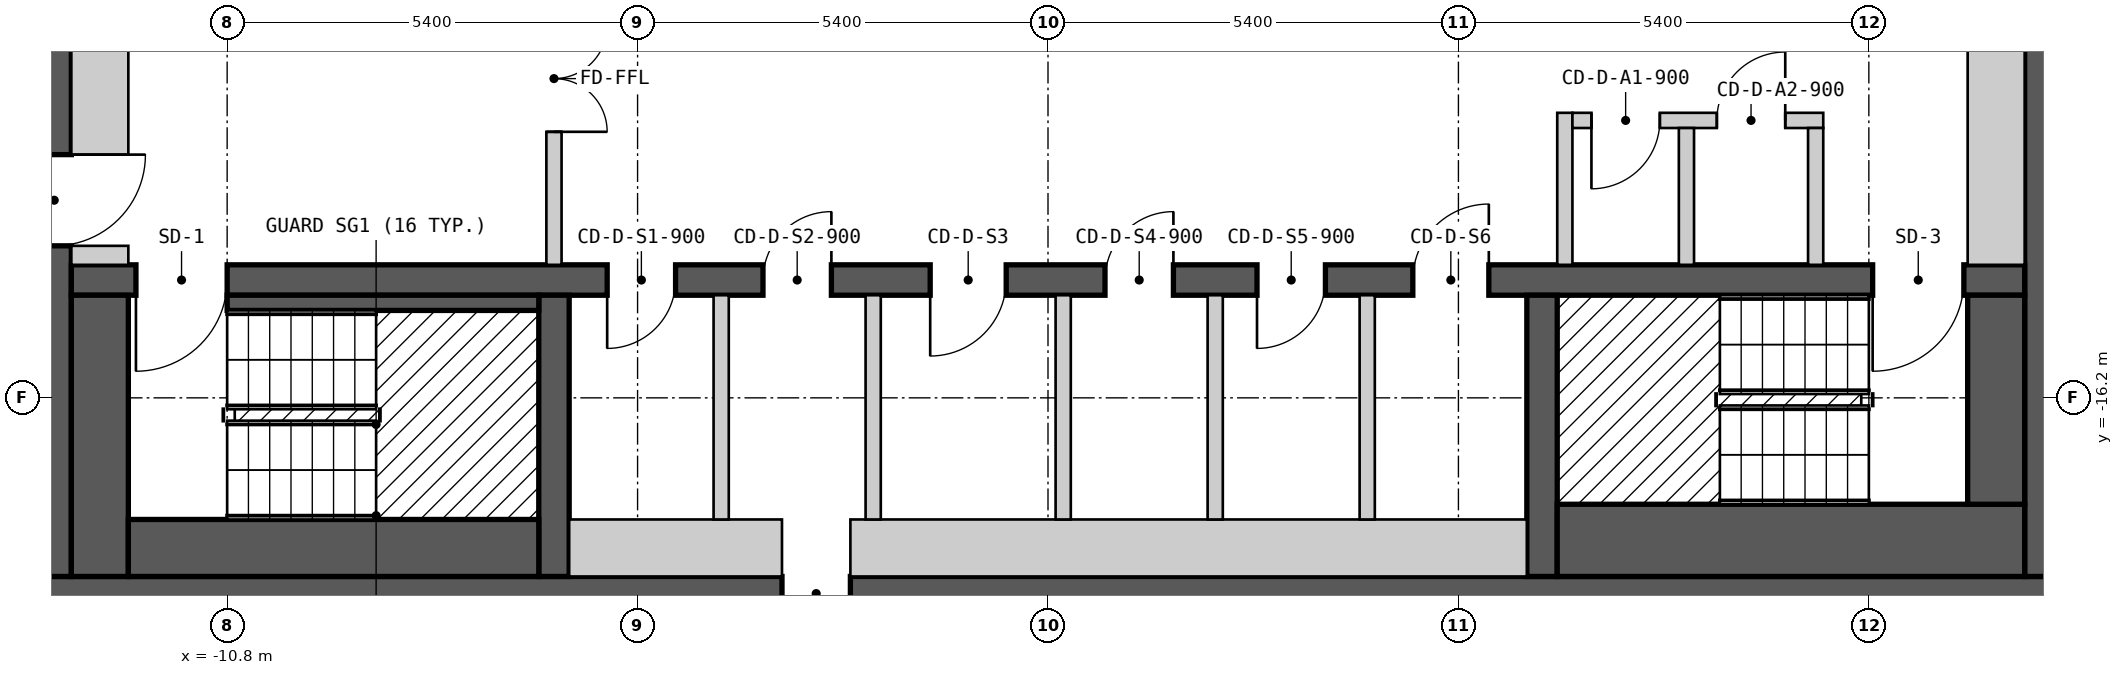
"""IFC4 building model, lengths in metres.
Left out: names, types, materials, properties, quantities, classifications, styles, units other than length and angle.
Written with IfcOpenShell. Run it as: python <this file> out.ifc"""

import sys

from ifc_helpers import new_model, si_unit, direction, frame, frame_2d, origin, place, context, subcontext, project, spatial, polyline, rectangle, outline, extrude, element, fill, save


model = new_model("IFC4")
c1 = context("Model", 3, precision=1e-05, world=origin(), true_north=direction((0.0, 1.0)))
c2 = subcontext(c1, "Body", "Model", "MODEL_VIEW")
j1 = project(units=[si_unit("LENGTHUNIT", "METRE"), si_unit("PLANEANGLEUNIT", "RADIAN")], contexts=[c1])
p1 = place(None, origin())
s1 = spatial("IfcSite", under=j1, at=p1, CompositionType="ELEMENT")
p2 = place(p1, origin())
s2 = spatial("IfcBuilding", under=s1, at=p2, CompositionType="ELEMENT")
p3 = place(p2, frame((0.0, 0.0, 226.8)))
s3 = spatial("IfcBuildingStorey", under=s2, at=p3, CompositionType="ELEMENT", Elevation=226.8)
p4 = place(p3, frame((-13.3, -18.775, 0.0), z_axis=(0.0, 0.0, 1.0), x_axis=(1.0, 0.0, 0.0)))
e1 = element("IfcWall", 1, at=p4, inside=s3, PredefinedType="SHEAR", context=c2, shape_type="SweptSolid", body=[
    extrude(rectangle(XDim=26.6, YDim=0.45, at=frame_2d((13.3, 0.0))), origin(), (0.0, 0.0, 1.0), 2.7),
])
p5 = place(p4, frame((9.8, 0.0, 0.0)))
e2 = element("IfcOpeningElement", 2, at=p5, cuts=e1, PredefinedType="OPENING", context=c2, shape_type="SweptSolid", body=[
    extrude(rectangle(XDim=0.9, YDim=2.1, at=frame_2d((0.45, 1.05))), frame((0.0, 0.235, 0.0), z_axis=(0.0, -1.0, 0.0), x_axis=(1.0, 0.0, 0.0)), (0.0, 0.0, 1.0), 0.47),
])
p6 = place(p3, frame((-13.075, -18.55, 0.0), z_axis=(0.0, 0.0, 1.0), x_axis=(0.0, 1.0, 0.0)))
e3 = element("IfcWall", 3, at=p6, inside=s3, PredefinedType="SHEAR", context=c2, shape_type="SweptSolid", body=[
    extrude(rectangle(XDim=13.1, YDim=0.45, at=frame_2d((6.55, 0.0))), origin(), (0.0, 0.0, 1.0), 2.7),
])
p7 = place(p6, frame((4.35, 0.0, 0.0)))
e4 = element("IfcOpeningElement", 4, at=p7, cuts=e3, PredefinedType="OPENING", context=c2, shape_type="SweptSolid", body=[
    extrude(rectangle(XDim=1.2, YDim=2.1, at=frame_2d((0.6, 1.05))), frame((0.0, 0.235, 0.0), z_axis=(0.0, -1.0, 0.0), x_axis=(1.0, 0.0, 0.0)), (0.0, 0.0, 1.0), 0.47),
])
p8 = place(p3, frame((13.075, -18.55, 0.0), z_axis=(0.0, 0.0, 1.0), x_axis=(0.0, 1.0, 0.0)))
e5 = element("IfcWall", 5, at=p8, inside=s3, PredefinedType="SHEAR", context=c2, shape_type="SweptSolid", body=[
    extrude(rectangle(XDim=13.1, YDim=0.45, at=frame_2d((6.55, 0.0))), origin(), (0.0, 0.0, 1.0), 2.7),
])
p9 = place(p3, frame((-12.85, -14.65, 0.0), z_axis=(0.0, 0.0, 1.0), x_axis=(1.0, 0.0, 0.0)))
e6 = element("IfcWall", 6, at=p9, inside=s3, PredefinedType="SHEAR", context=c2, shape_type="SweptSolid", body=[
    extrude(rectangle(XDim=25.7, YDim=0.4, at=frame_2d((12.85, 0.0))), origin(), (0.0, 0.0, 1.0), 2.7),
])
p10 = place(p9, frame((2.05, 0.0, 0.0), z_axis=(0.0, 0.0, 1.0), x_axis=(-1.0, 0.0, 0.0)))
e7 = element("IfcOpeningElement", 7, at=p10, cuts=e6, PredefinedType="OPENING", context=c2, shape_type="SweptSolid", body=[
    extrude(rectangle(XDim=1.2, YDim=2.1, at=frame_2d((0.6, 1.05))), frame((0.0, 0.21, 0.0), z_axis=(0.0, -1.0, 0.0), x_axis=(1.0, 0.0, 0.0)), (0.0, 0.0, 1.0), 0.42),
])
p11 = place(p9, frame((24.9, 0.0, 0.0), z_axis=(0.0, 0.0, 1.0), x_axis=(-1.0, 0.0, 0.0)))
e8 = element("IfcOpeningElement", 8, at=p11, cuts=e6, PredefinedType="OPENING", context=c2, shape_type="SweptSolid", body=[
    extrude(rectangle(XDim=1.2, YDim=2.1, at=frame_2d((0.6, 1.05))), frame((0.0, 0.21, 0.0), z_axis=(0.0, -1.0, 0.0), x_axis=(1.0, 0.0, 0.0)), (0.0, 0.0, 1.0), 0.42),
])
p12 = place(p9, frame((7.95, 0.0, 0.0), z_axis=(0.0, 0.0, 1.0), x_axis=(-1.0, 0.0, 0.0)))
e9 = element("IfcOpeningElement", 9, at=p12, cuts=e6, PredefinedType="OPENING", context=c2, shape_type="SweptSolid", body=[
    extrude(rectangle(XDim=0.9, YDim=2.1, at=frame_2d((0.45, 1.05))), frame((0.0, 0.21, 0.0), z_axis=(0.0, -1.0, 0.0), x_axis=(1.0, 0.0, 0.0)), (0.0, 0.0, 1.0), 0.42),
])
p13 = place(p9, frame((10.0, 0.0, 0.0), z_axis=(0.0, 0.0, 1.0), x_axis=(-1.0, 0.0, 0.0)))
e10 = element("IfcOpeningElement", 10, at=p13, cuts=e6, PredefinedType="OPENING", context=c2, shape_type="SweptSolid", body=[
    extrude(rectangle(XDim=0.9, YDim=2.1, at=frame_2d((0.45, 1.05))), frame((0.0, 0.21, 0.0), z_axis=(0.0, -1.0, 0.0), x_axis=(1.0, 0.0, 0.0)), (0.0, 0.0, 1.0), 0.42),
])
p14 = place(p9, frame((12.3, 0.0, 0.0), z_axis=(0.0, 0.0, 1.0), x_axis=(-1.0, 0.0, 0.0)))
e11 = element("IfcOpeningElement", 11, at=p14, cuts=e6, PredefinedType="OPENING", context=c2, shape_type="SweptSolid", body=[
    extrude(rectangle(XDim=1.0, YDim=2.1, at=frame_2d((0.5, 1.05))), frame((0.0, 0.21, 0.0), z_axis=(0.0, -1.0, 0.0), x_axis=(1.0, 0.0, 0.0)), (0.0, 0.0, 1.0), 0.42),
])
p15 = place(p9, frame((14.5, 0.0, 0.0), z_axis=(0.0, 0.0, 1.0), x_axis=(-1.0, 0.0, 0.0)))
e12 = element("IfcOpeningElement", 12, at=p15, cuts=e6, PredefinedType="OPENING", context=c2, shape_type="SweptSolid", body=[
    extrude(rectangle(XDim=0.9, YDim=2.1, at=frame_2d((0.45, 1.05))), frame((0.0, 0.21, 0.0), z_axis=(0.0, -1.0, 0.0), x_axis=(1.0, 0.0, 0.0)), (0.0, 0.0, 1.0), 0.42),
])
p16 = place(p9, frame((16.5, 0.0, 0.0), z_axis=(0.0, 0.0, 1.0), x_axis=(-1.0, 0.0, 0.0)))
e13 = element("IfcOpeningElement", 13, at=p16, cuts=e6, PredefinedType="OPENING", context=c2, shape_type="SweptSolid", body=[
    extrude(rectangle(XDim=0.9, YDim=2.1, at=frame_2d((0.45, 1.05))), frame((0.0, 0.21, 0.0), z_axis=(0.0, -1.0, 0.0), x_axis=(1.0, 0.0, 0.0)), (0.0, 0.0, 1.0), 0.42),
])
p17 = place(p9, frame((18.65, 0.0, 0.0), z_axis=(0.0, 0.0, 1.0), x_axis=(-1.0, 0.0, 0.0)))
e14 = element("IfcOpeningElement", 14, at=p17, cuts=e6, PredefinedType="OPENING", context=c2, shape_type="SweptSolid", body=[
    extrude(rectangle(XDim=1.0, YDim=2.1, at=frame_2d((0.5, 1.05))), frame((0.0, 0.21, 0.0), z_axis=(0.0, -1.0, 0.0), x_axis=(1.0, 0.0, 0.0)), (0.0, 0.0, 1.0), 0.42),
])
for number, where, z_axis, x_axis in (
    (15, (-6.5, -18.55, 0.0), (0.0, 0.0, 1.0), (0.0, 1.0, 0.0)),
    (16, (6.5, -18.55, 0.0), (0.0, 0.0, 1.0), (0.0, 1.0, 0.0)),
):
    element("IfcWall", number, at=place(p3, frame(where, z_axis=z_axis, x_axis=x_axis)), inside=s3, PredefinedType="SHEAR", context=c2, shape_type="SweptSolid", body=[
        extrude(rectangle(XDim=3.7, YDim=0.4, at=frame_2d((1.85, 0.0))), origin(), (0.0, 0.0, 1.0), 2.7),
    ])
p18 = place(p3, frame((-15.34, -18.37, 0.0), z_axis=(0.0, 0.0, 1.0), x_axis=(0.866022959057, -0.500004234368, 0.0)))
e17 = element("IfcWall", 17, at=p18, inside=s3, PredefinedType="SOLIDWALL", context=c2, shape_type="SweptSolid", body=[
    extrude(outline(polyline([(0.0, -0.15), (5.0, -0.15), (4.92, 0.15), (0.08, 0.15), (0.0, -0.15)])), origin(), (0.0, 0.0, 1.0), 2.7),
])
p19 = place(p18, frame((0.65, 0.0, 0.15)))
e18 = element("IfcOpeningElement", 18, at=p19, cuts=e17, PredefinedType="OPENING", context=c2, shape_type="SweptSolid", body=[
    extrude(rectangle(XDim=1.2, YDim=2.1, at=frame_2d((0.6, 1.05))), frame((0.0, 0.16, 0.0), z_axis=(0.0, -1.0, 0.0), x_axis=(1.0, 0.0, 0.0)), (0.0, 0.0, 1.0), 0.32),
])
p20 = place(p18, frame((3.15, 0.0, 0.15)))
e19 = element("IfcOpeningElement", 19, at=p20, cuts=e17, PredefinedType="OPENING", context=c2, shape_type="SweptSolid", body=[
    extrude(rectangle(XDim=1.2, YDim=2.1, at=frame_2d((0.6, 1.05))), frame((0.0, 0.16, 0.0), z_axis=(0.0, -1.0, 0.0), x_axis=(1.0, 0.0, 0.0)), (0.0, 0.0, 1.0), 0.32),
])
p21 = place(p3, frame((11.01, -20.87, 0.0), z_axis=(0.0, 0.0, 1.0), x_axis=(0.866022959057, 0.500004234368, 0.0)))
e20 = element("IfcWall", 20, at=p21, inside=s3, PredefinedType="SOLIDWALL", context=c2, shape_type="SweptSolid", body=[
    extrude(outline(polyline([(0.0, -0.15), (5.0, -0.15), (4.92, 0.15), (0.08, 0.15), (0.0, -0.15)])), origin(), (0.0, 0.0, 1.0), 2.7),
])
p22 = place(p21, frame((0.65, 0.0, 0.15)))
e21 = element("IfcOpeningElement", 21, at=p22, cuts=e20, PredefinedType="OPENING", context=c2, shape_type="SweptSolid", body=[
    extrude(rectangle(XDim=1.2, YDim=2.1, at=frame_2d((0.6, 1.05))), frame((0.0, 0.16, 0.0), z_axis=(0.0, -1.0, 0.0), x_axis=(1.0, 0.0, 0.0)), (0.0, 0.0, 1.0), 0.32),
])
p23 = place(p21, frame((3.149, 0.0, 0.15)))
e22 = element("IfcOpeningElement", 22, at=p23, cuts=e20, PredefinedType="OPENING", context=c2, shape_type="SweptSolid", body=[
    extrude(rectangle(XDim=1.2, YDim=2.1, at=frame_2d((0.6, 1.05))), frame((0.0, 0.16, 0.0), z_axis=(0.0, -1.0, 0.0), x_axis=(1.0, 0.0, 0.0)), (0.0, 0.0, 1.0), 0.32),
])
p24 = place(p3, frame((-12.475, -18.55, 0.0), z_axis=(0.0, 0.0, 1.0), x_axis=(0.0, 1.0, 0.0)))
e23 = element("IfcWall", 23, at=p24, inside=s3, PredefinedType="SOLIDWALL", context=c2, shape_type="SweptSolid", body=[
    extrude(rectangle(XDim=3.7, YDim=0.75, at=frame_2d((1.85, 0.0))), origin(), (0.0, 0.0, 1.0), 2.7),
])
p25 = place(p3, frame((-12.85, -14.325, 0.0), z_axis=(0.0, 0.0, 1.0), x_axis=(1.0, 0.0, 0.0)))
e24 = element("IfcWall", 24, at=p25, inside=s3, PredefinedType="PARTITIONING", context=c2, shape_type="SweptSolid", body=[
    extrude(rectangle(XDim=0.75, YDim=0.25, at=frame_2d((0.375, 0.0))), origin(), (0.0, 0.0, 1.0), 2.7),
])
p26 = place(p3, frame((-12.475, -13.0, 0.0), z_axis=(0.0, 0.0, 1.0), x_axis=(0.0, 1.0, 0.0)))
e25 = element("IfcWall", 25, at=p26, inside=s3, PredefinedType="PARTITIONING", context=c2, shape_type="SweptSolid", body=[
    extrude(rectangle(XDim=3.45, YDim=0.75, at=frame_2d((1.725, 0.0))), origin(), (0.0, 0.0, 1.0), 2.7),
])
p27 = place(p3, frame((-12.1, -18.175, 0.0), z_axis=(0.0, 0.0, 1.0), x_axis=(1.0, 0.0, 0.0)))
e26 = element("IfcWall", 26, at=p27, inside=s3, PredefinedType="SOLIDWALL", context=c2, shape_type="SweptSolid", body=[
    extrude(rectangle(XDim=5.4, YDim=0.75, at=frame_2d((2.7, 0.0))), origin(), (0.0, 0.0, 1.0), 2.7),
])
p28 = place(p3, frame((-10.8, -14.95, 0.0), z_axis=(0.0, 0.0, 1.0), x_axis=(1.0, 0.0, 0.0)))
e27 = element("IfcWall", 27, at=p28, inside=s3, PredefinedType="SOLIDWALL", context=c2, shape_type="SweptSolid", body=[
    extrude(rectangle(XDim=4.1, YDim=0.2, at=frame_2d((2.05, 0.0))), origin(), (0.0, 0.0, 1.0), 2.7),
])
p29 = place(p3, frame((-6.5, -14.45, 0.0), z_axis=(0.0, 0.0, 1.0), x_axis=(0.0, 1.0, 0.0)))
e28 = element("IfcWall", 28, at=p29, inside=s3, PredefinedType="PARTITIONING", context=c2, shape_type="SweptSolid", body=[
    extrude(rectangle(XDim=4.9, YDim=0.2, at=frame_2d((2.45, 0.0))), origin(), (0.0, 0.0, 1.0), 2.7),
])
p30 = place(p29, frame((3.15, 0.0, 0.0), z_axis=(0.0, 0.0, 1.0), x_axis=(-1.0, 0.0, 0.0)))
e29 = element("IfcOpeningElement", 29, at=p30, cuts=e28, PredefinedType="OPENING", context=c2, shape_type="SweptSolid", body=[
    extrude(rectangle(XDim=1.4, YDim=2.1, at=frame_2d((0.7, 1.05))), frame((0.0, 0.11, 0.0), z_axis=(0.0, -1.0, 0.0), x_axis=(1.0, 0.0, 0.0)), (0.0, 0.0, 1.0), 0.22),
])
p31 = place(p3, frame((-6.3, -18.175, 0.0), z_axis=(0.0, 0.0, 1.0), x_axis=(1.0, 0.0, 0.0)))
e30 = element("IfcWall", 30, at=p31, inside=s3, PredefinedType="PARTITIONING", context=c2, shape_type="SweptSolid", body=[
    extrude(rectangle(XDim=2.8, YDim=0.75, at=frame_2d((1.4, 0.0))), origin(), (0.0, 0.0, 1.0), 2.7),
])
p32 = place(p3, frame((-4.3, -17.8, 0.0), z_axis=(0.0, 0.0, 1.0), x_axis=(0.0, 1.0, 0.0)))
e31 = element("IfcWall", 31, at=p32, inside=s3, PredefinedType="PARTITIONING", context=c2, shape_type="SweptSolid", body=[
    extrude(rectangle(XDim=2.95, YDim=0.2, at=frame_2d((1.475, 0.0))), origin(), (0.0, 0.0, 1.0), 2.7),
])
p33 = place(p3, frame((-2.6, -18.175, 0.0), z_axis=(0.0, 0.0, 1.0), x_axis=(1.0, 0.0, 0.0)))
e32 = element("IfcWall", 32, at=p33, inside=s3, PredefinedType="PARTITIONING", context=c2, shape_type="SweptSolid", body=[
    extrude(rectangle(XDim=8.9, YDim=0.75, at=frame_2d((4.45, 0.0))), origin(), (0.0, 0.0, 1.0), 2.7),
])
for number, where, z_axis, x_axis in (
    (33, (-2.3, -17.8, 0.0), (0.0, 0.0, 1.0), (0.0, 1.0, 0.0)),
    (34, (0.2, -17.8, 0.0), (0.0, 0.0, 1.0), (0.0, 1.0, 0.0)),
    (35, (2.2, -17.8, 0.0), (0.0, 0.0, 1.0), (0.0, 1.0, 0.0)),
    (36, (4.2, -17.8, 0.0), (0.0, 0.0, 1.0), (0.0, 1.0, 0.0)),
):
    element("IfcWall", number, at=place(p3, frame(where, z_axis=z_axis, x_axis=x_axis)), inside=s3, PredefinedType="PARTITIONING", context=c2, shape_type="SweptSolid", body=[
        extrude(rectangle(XDim=2.95, YDim=0.2, at=frame_2d((1.475, 0.0))), origin(), (0.0, 0.0, 1.0), 2.7),
    ])
p34 = place(p3, frame((6.7, -18.075, 0.0), z_axis=(0.0, 0.0, 1.0), x_axis=(1.0, 0.0, 0.0)))
e37 = element("IfcWall", 37, at=p34, inside=s3, PredefinedType="SOLIDWALL", context=c2, shape_type="SweptSolid", body=[
    extrude(rectangle(XDim=6.15, YDim=0.95, at=frame_2d((3.075, 0.0))), origin(), (0.0, 0.0, 1.0), 2.7),
])
p35 = place(p3, frame((6.8, -14.45, 0.0), z_axis=(0.0, 0.0, 1.0), x_axis=(0.0, 1.0, 0.0)))
e38 = element("IfcWall", 38, at=p35, inside=s3, PredefinedType="PARTITIONING", context=c2, shape_type="SweptSolid", body=[
    extrude(rectangle(XDim=2.0, YDim=0.2, at=frame_2d((1.0, 0.0))), origin(), (0.0, 0.0, 1.0), 2.7),
])
p36 = place(p3, frame((6.9, -12.55, 0.0), z_axis=(0.0, 0.0, 1.0), x_axis=(1.0, 0.0, 0.0)))
e39 = element("IfcWall", 39, at=p36, inside=s3, PredefinedType="PARTITIONING", context=c2, shape_type="SweptSolid", body=[
    extrude(rectangle(XDim=3.3, YDim=0.2, at=frame_2d((1.65, 0.0))), origin(), (0.0, 0.0, 1.0), 2.7),
])
p37 = place(p36, frame((1.15, 0.0, 0.0), z_axis=(0.0, 0.0, 1.0), x_axis=(-1.0, 0.0, 0.0)))
e40 = element("IfcOpeningElement", 40, at=p37, cuts=e39, PredefinedType="OPENING", context=c2, shape_type="SweptSolid", body=[
    extrude(rectangle(XDim=0.9, YDim=2.1, at=frame_2d((0.45, 1.05))), frame((0.0, 0.11, 0.0), z_axis=(0.0, -1.0, 0.0), x_axis=(1.0, 0.0, 0.0)), (0.0, 0.0, 1.0), 0.22),
])
p38 = place(p36, frame((2.8, 0.0, 0.0), z_axis=(0.0, 0.0, 1.0), x_axis=(-1.0, 0.0, 0.0)))
e41 = element("IfcOpeningElement", 41, at=p38, cuts=e39, PredefinedType="OPENING", context=c2, shape_type="SweptSolid", body=[
    extrude(rectangle(XDim=0.9, YDim=2.1, at=frame_2d((0.45, 1.05))), frame((0.0, 0.11, 0.0), z_axis=(0.0, -1.0, 0.0), x_axis=(1.0, 0.0, 0.0)), (0.0, 0.0, 1.0), 0.22),
])
for number, where, z_axis, x_axis in (
    (42, (8.4, -14.45, 0.0), (0.0, 0.0, 1.0), (0.0, 1.0, 0.0)),
    (43, (10.1, -14.45, 0.0), (0.0, 0.0, 1.0), (0.0, 1.0, 0.0)),
):
    element("IfcWall", number, at=place(p3, frame(where, z_axis=z_axis, x_axis=x_axis)), inside=s3, PredefinedType="PARTITIONING", context=c2, shape_type="SweptSolid", body=[
        extrude(rectangle(XDim=1.8, YDim=0.2, at=frame_2d((0.9, 0.0))), origin(), (0.0, 0.0, 1.0), 2.7),
    ])
p39 = place(p3, frame((12.475, -17.6, 0.0), z_axis=(0.0, 0.0, 1.0), x_axis=(0.0, 1.0, 0.0)))
e44 = element("IfcWall", 44, at=p39, inside=s3, PredefinedType="SOLIDWALL", context=c2, shape_type="SweptSolid", body=[
    extrude(rectangle(XDim=2.75, YDim=0.75, at=frame_2d((1.375, 0.0))), origin(), (0.0, 0.0, 1.0), 2.7),
])
p40 = place(p3, frame((12.475, -14.45, 0.0), z_axis=(0.0, 0.0, 1.0), x_axis=(0.0, 1.0, 0.0)))
e45 = element("IfcWall", 45, at=p40, inside=s3, PredefinedType="PARTITIONING", context=c2, shape_type="SweptSolid", body=[
    extrude(rectangle(XDim=8.25, YDim=0.75, at=frame_2d((4.125, 0.0))), origin(), (0.0, 0.0, 1.0), 2.7),
])
p41 = place(p10, origin())
e46 = element("IfcDoor", 46, at=p41, inside=s3, OperationType="SINGLE_SWING_RIGHT", PredefinedType="DOOR", context=c2, shape_type="SweptSolid", body=[
    extrude(rectangle(XDim=1.2, YDim=2.1, at=frame_2d((0.6, 1.05))), frame((0.0, 0.025, 0.0), z_axis=(0.0, -1.0, 0.0), x_axis=(1.0, 0.0, 0.0)), (0.0, 0.0, 1.0), 0.05),
])
fill(e7, e46)
p42 = place(p11, origin())
e47 = element("IfcDoor", 47, at=p42, inside=s3, OperationType="SINGLE_SWING_RIGHT", PredefinedType="DOOR", context=c2, shape_type="SweptSolid", body=[
    extrude(rectangle(XDim=1.2, YDim=2.1, at=frame_2d((0.6, 1.05))), frame((0.0, 0.025, 0.0), z_axis=(0.0, -1.0, 0.0), x_axis=(1.0, 0.0, 0.0)), (0.0, 0.0, 1.0), 0.05),
])
fill(e8, e47)
p43 = place(p7, origin())
e48 = element("IfcDoor", 48, at=p43, inside=s3, OperationType="SINGLE_SWING_RIGHT", PredefinedType="DOOR", context=c2, shape_type="SweptSolid", body=[
    extrude(rectangle(XDim=1.2, YDim=2.1, at=frame_2d((0.6, 1.05))), frame((0.0, 0.025, 0.0), z_axis=(0.0, -1.0, 0.0), x_axis=(1.0, 0.0, 0.0)), (0.0, 0.0, 1.0), 0.05),
])
fill(e4, e48)
p44 = place(p30, origin())
e49 = element("IfcDoor", 49, at=p44, inside=s3, OperationType="DOUBLE_DOOR_SINGLE_SWING", PredefinedType="DOOR", context=c2, shape_type="SweptSolid", body=[
    extrude(rectangle(XDim=1.4, YDim=2.1, at=frame_2d((0.7, 1.05))), frame((0.0, 0.025, 0.0), z_axis=(0.0, -1.0, 0.0), x_axis=(1.0, 0.0, 0.0)), (0.0, 0.0, 1.0), 0.05),
])
fill(e29, e49)
p45 = place(p37, origin())
e50 = element("IfcDoor", 50, at=p45, inside=s3, OperationType="SINGLE_SWING_RIGHT", PredefinedType="DOOR", context=c2, shape_type="SweptSolid", body=[
    extrude(rectangle(XDim=0.9, YDim=2.1, at=frame_2d((0.45, 1.05))), frame((0.0, 0.025, 0.0), z_axis=(0.0, -1.0, 0.0), x_axis=(1.0, 0.0, 0.0)), (0.0, 0.0, 1.0), 0.05),
])
fill(e40, e50)
p46 = place(p38, origin())
e51 = element("IfcDoor", 51, at=p46, inside=s3, OperationType="SINGLE_SWING_LEFT", PredefinedType="DOOR", context=c2, shape_type="SweptSolid", body=[
    extrude(rectangle(XDim=0.9, YDim=2.1, at=frame_2d((0.45, 1.05))), frame((0.0, 0.025, 0.0), z_axis=(0.0, -1.0, 0.0), x_axis=(1.0, 0.0, 0.0)), (0.0, 0.0, 1.0), 0.05),
])
fill(e41, e51)
p47 = place(p12, origin())
e52 = element("IfcDoor", 52, at=p47, inside=s3, OperationType="SINGLE_SWING_RIGHT", PredefinedType="DOOR", context=c2, shape_type="SweptSolid", body=[
    extrude(rectangle(XDim=0.9, YDim=2.1, at=frame_2d((0.45, 1.05))), frame((0.0, 0.025, 0.0), z_axis=(0.0, -1.0, 0.0), x_axis=(1.0, 0.0, 0.0)), (0.0, 0.0, 1.0), 0.05),
])
fill(e9, e52)
p48 = place(p13, origin())
e53 = element("IfcDoor", 53, at=p48, inside=s3, OperationType="SINGLE_SWING_LEFT", PredefinedType="DOOR", context=c2, shape_type="SweptSolid", body=[
    extrude(rectangle(XDim=0.9, YDim=2.1, at=frame_2d((0.45, 1.05))), frame((0.0, 0.025, 0.0), z_axis=(0.0, -1.0, 0.0), x_axis=(1.0, 0.0, 0.0)), (0.0, 0.0, 1.0), 0.05),
])
fill(e10, e53)
p49 = place(p14, origin())
e54 = element("IfcDoor", 54, at=p49, inside=s3, OperationType="SINGLE_SWING_RIGHT", PredefinedType="DOOR", context=c2, shape_type="SweptSolid", body=[
    extrude(rectangle(XDim=1.0, YDim=2.1, at=frame_2d((0.5, 1.05))), frame((0.0, 0.025, 0.0), z_axis=(0.0, -1.0, 0.0), x_axis=(1.0, 0.0, 0.0)), (0.0, 0.0, 1.0), 0.05),
])
fill(e11, e54)
p50 = place(p15, origin())
e55 = element("IfcDoor", 55, at=p50, inside=s3, OperationType="SINGLE_SWING_LEFT", PredefinedType="DOOR", context=c2, shape_type="SweptSolid", body=[
    extrude(rectangle(XDim=0.9, YDim=2.1, at=frame_2d((0.45, 1.05))), frame((0.0, 0.025, 0.0), z_axis=(0.0, -1.0, 0.0), x_axis=(1.0, 0.0, 0.0)), (0.0, 0.0, 1.0), 0.05),
])
fill(e12, e55)
p51 = place(p16, origin())
e56 = element("IfcDoor", 56, at=p51, inside=s3, OperationType="SINGLE_SWING_RIGHT", PredefinedType="DOOR", context=c2, shape_type="SweptSolid", body=[
    extrude(rectangle(XDim=0.9, YDim=2.1, at=frame_2d((0.45, 1.05))), frame((0.0, 0.025, 0.0), z_axis=(0.0, -1.0, 0.0), x_axis=(1.0, 0.0, 0.0)), (0.0, 0.0, 1.0), 0.05),
])
fill(e13, e56)
p52 = place(p17, origin())
e57 = element("IfcDoor", 57, at=p52, inside=s3, OperationType="SINGLE_SWING_LEFT", PredefinedType="DOOR", context=c2, shape_type="SweptSolid", body=[
    extrude(rectangle(XDim=1.0, YDim=2.1, at=frame_2d((0.5, 1.05))), frame((0.0, 0.025, 0.0), z_axis=(0.0, -1.0, 0.0), x_axis=(1.0, 0.0, 0.0)), (0.0, 0.0, 1.0), 0.05),
])
fill(e14, e57)
p53 = place(p5, origin())
e58 = element("IfcDoor", 58, at=p53, inside=s3, OperationType="SINGLE_SWING_RIGHT", PredefinedType="DOOR", context=c2, shape_type="SweptSolid", body=[
    extrude(rectangle(XDim=0.9, YDim=2.1, at=frame_2d((0.45, 1.05))), frame((0.0, 0.025, 0.0), z_axis=(0.0, -1.0, 0.0), x_axis=(1.0, 0.0, 0.0)), (0.0, 0.0, 1.0), 0.05),
])
fill(e2, e58)
save(model, sys.argv[1])
